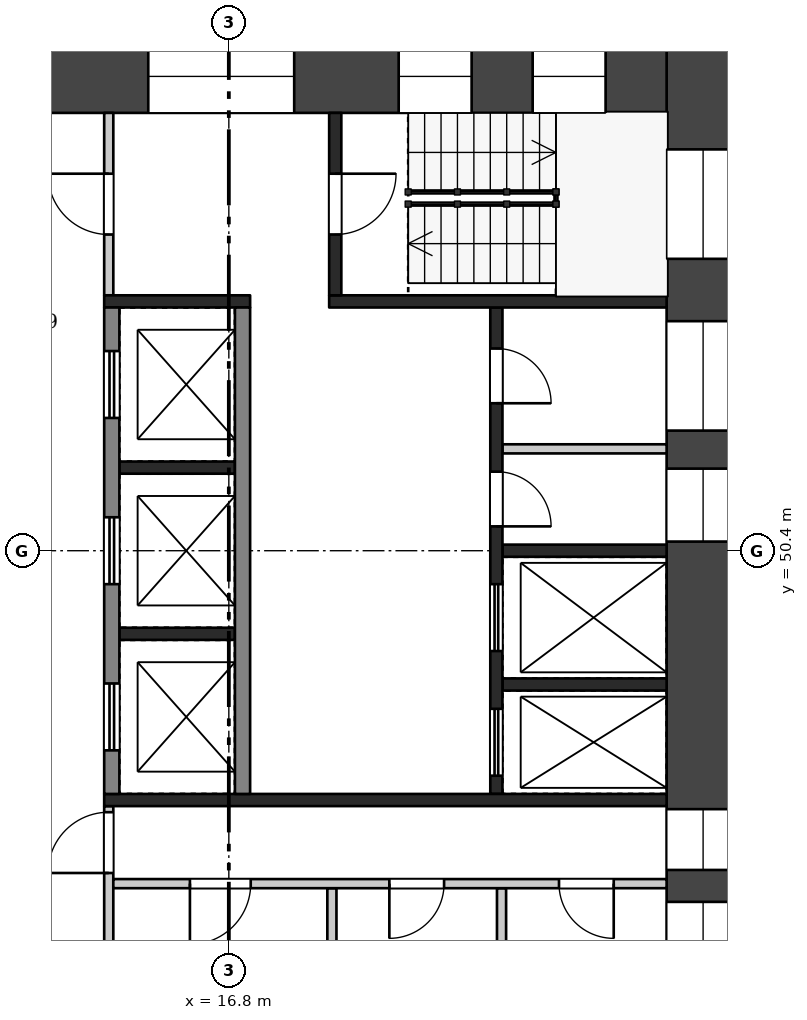
"""IFC4 building model, lengths in metres.
Left out: names, types, materials, properties, quantities, classifications, styles, units other than length and angle.
Written with IfcOpenShell. Run it as: python <this file> out.ifc"""

import sys

from ifc_helpers import new_model, si_unit, direction, frame, frame_2d, origin, place, context, subcontext, project, spatial, rectangle, extrude, element, fill, save


model = new_model("IFC4")
c1 = context("Model", 3, precision=1e-05, world=origin(), true_north=direction((0.0, 1.0)))
c2 = subcontext(c1, "Body", "Model", "MODEL_VIEW")
j1 = project(units=[si_unit("LENGTHUNIT", "METRE"), si_unit("PLANEANGLEUNIT", "RADIAN")], contexts=[c1])
p1 = place(None, origin())
s1 = spatial("IfcSite", under=j1, at=p1, CompositionType="ELEMENT")
p2 = place(p1, origin())
s2 = spatial("IfcBuilding", under=s1, at=p2, CompositionType="ELEMENT")
p3 = place(p2, frame((0.0, 0.0, 147.7)))
s3 = spatial("IfcBuildingStorey", under=s2, at=p3, CompositionType="ELEMENT", Elevation=147.7)
p4 = place(p3, frame((24.6, 58.8, 0.0), z_axis=(0.0, 0.0, 1.0), x_axis=(0.0, -1.0, 0.0)))
e1 = element("IfcWall", 1, at=p4, inside=s3, PredefinedType="SHEAR", context=c2, shape_type="SweptSolid", body=[
    extrude(rectangle(XDim=16.8, YDim=1.2, at=frame_2d((8.4, 0.0))), origin(), (0.0, 0.0, 1.0), 3.22),
])
p5 = place(p4, frame((1.8, 0.0, 0.5)))
e2 = element("IfcOpeningElement", 2, at=p5, cuts=e1, PredefinedType="OPENING", context=c2, shape_type="SweptSolid", body=[
    extrude(rectangle(XDim=1.8, YDim=2.4, at=frame_2d((0.9, 1.2))), frame((0.0, 0.61, 0.0), z_axis=(0.0, -1.0, 0.0), x_axis=(1.0, 0.0, 0.0)), (0.0, 0.0, 1.0), 1.22),
])
p6 = place(p4, frame((4.625, 0.0, 1.6)))
e3 = element("IfcOpeningElement", 3, at=p6, cuts=e1, PredefinedType="OPENING", context=c2, shape_type="SweptSolid", body=[
    extrude(rectangle(XDim=1.8, YDim=1.2, at=frame_2d((0.9, 0.6))), frame((0.0, 0.61, 0.0), z_axis=(0.0, -1.0, 0.0), x_axis=(1.0, 0.0, 0.0)), (0.0, 0.0, 1.0), 1.22),
])
p7 = place(p4, frame((7.05, 0.0, 1.6)))
e4 = element("IfcOpeningElement", 4, at=p7, cuts=e1, PredefinedType="OPENING", context=c2, shape_type="SweptSolid", body=[
    extrude(rectangle(XDim=1.2, YDim=1.2, at=frame_2d((0.6, 0.6))), frame((0.0, 0.61, 0.0), z_axis=(0.0, -1.0, 0.0), x_axis=(1.0, 0.0, 0.0)), (0.0, 0.0, 1.0), 1.22),
])
p8 = place(p4, frame((12.65, 0.0, 0.6)))
e5 = element("IfcOpeningElement", 5, at=p8, cuts=e1, PredefinedType="OPENING", context=c2, shape_type="SweptSolid", body=[
    extrude(rectangle(XDim=1.0, YDim=2.1, at=frame_2d((0.5, 1.05))), frame((0.0, 0.61, 0.0), z_axis=(0.0, -1.0, 0.0), x_axis=(1.0, 0.0, 0.0)), (0.0, 0.0, 1.0), 1.22),
])
p9 = place(p4, frame((14.175, 0.0, 1.6)))
e6 = element("IfcOpeningElement", 6, at=p9, cuts=e1, PredefinedType="OPENING", context=c2, shape_type="SweptSolid", body=[
    extrude(rectangle(XDim=1.2, YDim=1.2, at=frame_2d((0.6, 0.6))), frame((0.0, 0.61, 0.0), z_axis=(0.0, -1.0, 0.0), x_axis=(1.0, 0.0, 0.0)), (0.0, 0.0, 1.0), 1.22),
])
p10 = place(p3, frame((9.6, 58.2, 0.0), z_axis=(0.0, 0.0, 1.0), x_axis=(1.0, 0.0, 0.0)))
e7 = element("IfcWall", 7, at=p10, inside=s3, PredefinedType="SHEAR", context=c2, shape_type="SweptSolid", body=[
    extrude(rectangle(XDim=14.4, YDim=1.2, at=frame_2d((7.2, 0.0))), origin(), (0.0, 0.0, 1.0), 3.22),
])
p11 = place(p10, frame((1.105, 0.0, 0.6)))
e8 = element("IfcOpeningElement", 8, at=p11, cuts=e7, PredefinedType="OPENING", context=c2, shape_type="SweptSolid", body=[
    extrude(rectangle(XDim=3.0, YDim=2.1, at=frame_2d((1.5, 1.05))), frame((0.0, 0.61, 0.0), z_axis=(0.0, -1.0, 0.0), x_axis=(1.0, 0.0, 0.0)), (0.0, 0.0, 1.0), 1.22),
])
p12 = place(p10, frame((5.875, 0.0, 0.6)))
e9 = element("IfcOpeningElement", 9, at=p12, cuts=e7, PredefinedType="OPENING", context=c2, shape_type="SweptSolid", body=[
    extrude(rectangle(XDim=2.4, YDim=2.1, at=frame_2d((1.2, 1.05))), frame((0.0, 0.61, 0.0), z_axis=(0.0, -1.0, 0.0), x_axis=(1.0, 0.0, 0.0)), (0.0, 0.0, 1.0), 1.22),
])
p13 = place(p10, frame((9.993, 0.0, 0.5)))
e10 = element("IfcOpeningElement", 10, at=p13, cuts=e7, PredefinedType="OPENING", context=c2, shape_type="SweptSolid", body=[
    extrude(rectangle(XDim=1.2, YDim=2.4, at=frame_2d((0.6, 1.2))), frame((0.0, 0.61, 0.0), z_axis=(0.0, -1.0, 0.0), x_axis=(1.0, 0.0, 0.0)), (0.0, 0.0, 1.0), 1.22),
])
p14 = place(p10, frame((12.197, 0.0, 0.5)))
e11 = element("IfcOpeningElement", 11, at=p14, cuts=e7, PredefinedType="OPENING", context=c2, shape_type="SweptSolid", body=[
    extrude(rectangle(XDim=1.2, YDim=2.4, at=frame_2d((0.6, 1.2))), frame((0.0, 0.61, 0.0), z_axis=(0.0, -1.0, 0.0), x_axis=(1.0, 0.0, 0.0)), (0.0, 0.0, 1.0), 1.22),
])
for number, where, z_axis, x_axis in (
    (12, (15.0, 51.767, 0.0), (0.0, 0.0, 1.0), (1.0, 0.0, 0.0)),
    (13, (15.0, 49.033, 0.0), (0.0, 0.0, 1.0), (1.0, 0.0, 0.0)),
):
    element("IfcWall", number, at=place(p3, frame(where, z_axis=z_axis, x_axis=x_axis)), inside=s3, PredefinedType="SHEAR", context=c2, shape_type="SweptSolid", body=[
        extrude(rectangle(XDim=1.9, YDim=0.2, at=frame_2d((0.95, 0.0))), origin(), (0.0, 0.0, 1.0), 3.22),
    ])
p15 = place(p3, frame((14.875, 54.4, 0.0), z_axis=(0.0, 0.0, 1.0), x_axis=(0.0, -1.0, 0.0)))
e14 = element("IfcWall", 14, at=p15, inside=s3, PredefinedType="SHEAR", context=c2, shape_type="SweptSolid", body=[
    extrude(rectangle(XDim=8.0, YDim=0.25, at=frame_2d((4.0, 0.0))), origin(), (0.0, 0.0, 1.0), 3.22),
])
p16 = place(p15, frame((0.717, 0.0, 0.0)))
e15 = element("IfcOpeningElement", 15, at=p16, cuts=e14, PredefinedType="OPENING", context=c2, shape_type="SweptSolid", body=[
    extrude(rectangle(XDim=1.1, YDim=2.1, at=frame_2d((0.55, 1.05))), frame((0.0, 0.135, 0.0), z_axis=(0.0, -1.0, 0.0), x_axis=(1.0, 0.0, 0.0)), (0.0, 0.0, 1.0), 0.27),
])
p17 = place(p15, frame((3.45, 0.0, 0.0)))
e16 = element("IfcOpeningElement", 16, at=p17, cuts=e14, PredefinedType="OPENING", context=c2, shape_type="SweptSolid", body=[
    extrude(rectangle(XDim=1.1, YDim=2.1, at=frame_2d((0.55, 1.05))), frame((0.0, 0.135, 0.0), z_axis=(0.0, -1.0, 0.0), x_axis=(1.0, 0.0, 0.0)), (0.0, 0.0, 1.0), 0.27),
])
p18 = place(p15, frame((6.183, 0.0, 0.0)))
e17 = element("IfcOpeningElement", 17, at=p18, cuts=e14, PredefinedType="OPENING", context=c2, shape_type="SweptSolid", body=[
    extrude(rectangle(XDim=1.1, YDim=2.1, at=frame_2d((0.55, 1.05))), frame((0.0, 0.135, 0.0), z_axis=(0.0, -1.0, 0.0), x_axis=(1.0, 0.0, 0.0)), (0.0, 0.0, 1.0), 0.27),
])
p19 = place(p3, frame((17.025, 54.4, 0.0), z_axis=(0.0, 0.0, 1.0), x_axis=(0.0, -1.0, 0.0)))
e18 = element("IfcWall", 18, at=p19, inside=s3, PredefinedType="SHEAR", context=c2, shape_type="SweptSolid", body=[
    extrude(rectangle(XDim=8.0, YDim=0.25, at=frame_2d((4.0, 0.0))), origin(), (0.0, 0.0, 1.0), 3.22),
])
for number, where, z_axis, x_axis in (
    (19, (21.3, 50.4, 0.0), (0.0, 0.0, 1.0), (1.0, 0.0, 0.0)),
    (20, (21.3, 48.2, 0.0), (0.0, 0.0, 1.0), (1.0, 0.0, 0.0)),
):
    element("IfcWall", number, at=place(p3, frame(where, z_axis=z_axis, x_axis=x_axis)), inside=s3, PredefinedType="SHEAR", context=c2, shape_type="SweptSolid", body=[
        extrude(rectangle(XDim=2.7, YDim=0.2, at=frame_2d((1.35, 0.0))), origin(), (0.0, 0.0, 1.0), 3.22),
    ])
p20 = place(p3, frame((21.3, 52.075, 0.0), z_axis=(0.0, 0.0, 1.0), x_axis=(1.0, 0.0, 0.0)))
e21 = element("IfcWall", 21, at=p20, inside=s3, PredefinedType="PARTITIONING", context=c2, shape_type="SweptSolid", body=[
    extrude(rectangle(XDim=2.7, YDim=0.15, at=frame_2d((1.35, 0.0))), origin(), (0.0, 0.0, 1.0), 3.22),
])
p21 = place(p3, frame((21.2, 54.4, 0.0), z_axis=(0.0, 0.0, 1.0), x_axis=(0.0, -1.0, 0.0)))
e22 = element("IfcWall", 22, at=p21, inside=s3, PredefinedType="SHEAR", context=c2, shape_type="SweptSolid", body=[
    extrude(rectangle(XDim=8.0, YDim=0.2, at=frame_2d((4.0, 0.0))), origin(), (0.0, 0.0, 1.0), 3.22),
])
p22 = place(p21, frame((0.675, 0.0, 0.0)))
e23 = element("IfcOpeningElement", 23, at=p22, cuts=e22, PredefinedType="OPENING", context=c2, shape_type="SweptSolid", body=[
    extrude(rectangle(XDim=0.9, YDim=2.1, at=frame_2d((0.45, 1.05))), frame((0.0, 0.11, 0.0), z_axis=(0.0, -1.0, 0.0), x_axis=(1.0, 0.0, 0.0)), (0.0, 0.0, 1.0), 0.22),
])
p23 = place(p21, frame((2.7, 0.0, 0.0)))
e24 = element("IfcOpeningElement", 24, at=p23, cuts=e22, PredefinedType="OPENING", context=c2, shape_type="SweptSolid", body=[
    extrude(rectangle(XDim=0.9, YDim=2.1, at=frame_2d((0.45, 1.05))), frame((0.0, 0.11, 0.0), z_axis=(0.0, -1.0, 0.0), x_axis=(1.0, 0.0, 0.0)), (0.0, 0.0, 1.0), 0.22),
])
p24 = place(p21, frame((4.55, 0.0, 0.0)))
e25 = element("IfcOpeningElement", 25, at=p24, cuts=e22, PredefinedType="OPENING", context=c2, shape_type="SweptSolid", body=[
    extrude(rectangle(XDim=1.1, YDim=2.1, at=frame_2d((0.55, 1.05))), frame((0.0, 0.11, 0.0), z_axis=(0.0, -1.0, 0.0), x_axis=(1.0, 0.0, 0.0)), (0.0, 0.0, 1.0), 0.22),
])
p25 = place(p21, frame((6.6, 0.0, 0.0)))
e26 = element("IfcOpeningElement", 26, at=p25, cuts=e22, PredefinedType="OPENING", context=c2, shape_type="SweptSolid", body=[
    extrude(rectangle(XDim=1.1, YDim=2.1, at=frame_2d((0.55, 1.05))), frame((0.0, 0.11, 0.0), z_axis=(0.0, -1.0, 0.0), x_axis=(1.0, 0.0, 0.0)), (0.0, 0.0, 1.0), 0.22),
])
p26 = place(p3, frame((14.75, 54.5, 0.0), z_axis=(0.0, 0.0, 1.0), x_axis=(1.0, 0.0, 0.0)))
e27 = element("IfcWall", 27, at=p26, inside=s3, PredefinedType="SHEAR", context=c2, shape_type="SweptSolid", body=[
    extrude(rectangle(XDim=2.4, YDim=0.2, at=frame_2d((1.2, 0.0))), origin(), (0.0, 0.0, 1.0), 3.22),
])
p27 = place(p3, frame((18.45, 54.5, 0.0), z_axis=(0.0, 0.0, 1.0), x_axis=(1.0, 0.0, 0.0)))
e28 = element("IfcWall", 28, at=p27, inside=s3, PredefinedType="SHEAR", context=c2, shape_type="SweptSolid", body=[
    extrude(rectangle(XDim=5.55, YDim=0.2, at=frame_2d((2.775, 0.0))), origin(), (0.0, 0.0, 1.0), 3.22),
])
p28 = place(p3, frame((14.825, 57.6, 0.0), z_axis=(0.0, 0.0, 1.0), x_axis=(0.0, -1.0, 0.0)))
e29 = element("IfcWall", 29, at=p28, inside=s3, PredefinedType="PARTITIONING", context=c2, shape_type="SweptSolid", body=[
    extrude(rectangle(XDim=3.0, YDim=0.15, at=frame_2d((1.5, 0.0))), origin(), (0.0, 0.0, 1.0), 3.22),
])
p29 = place(p28, frame((1.0, 0.0, 0.0)))
e30 = element("IfcOpeningElement", 30, at=p29, cuts=e29, PredefinedType="OPENING", context=c2, shape_type="SweptSolid", body=[
    extrude(rectangle(XDim=1.0, YDim=2.1, at=frame_2d((0.5, 1.05))), frame((0.0, 0.085, 0.0), z_axis=(0.0, -1.0, 0.0), x_axis=(1.0, 0.0, 0.0)), (0.0, 0.0, 1.0), 0.17),
])
p30 = place(p3, frame((18.55, 57.6, 0.0), z_axis=(0.0, 0.0, 1.0), x_axis=(0.0, -1.0, 0.0)))
e31 = element("IfcWall", 31, at=p30, inside=s3, PredefinedType="SHEAR", context=c2, shape_type="SweptSolid", body=[
    extrude(rectangle(XDim=3.0, YDim=0.2, at=frame_2d((1.5, 0.0))), origin(), (0.0, 0.0, 1.0), 3.22),
])
p31 = place(p30, frame((1.0, 0.0, 0.0)))
e32 = element("IfcOpeningElement", 32, at=p31, cuts=e31, PredefinedType="OPENING", context=c2, shape_type="SweptSolid", body=[
    extrude(rectangle(XDim=1.0, YDim=2.1, at=frame_2d((0.5, 1.05))), frame((0.0, 0.11, 0.0), z_axis=(0.0, -1.0, 0.0), x_axis=(1.0, 0.0, 0.0)), (0.0, 0.0, 1.0), 0.22),
])
p32 = place(p3, frame((14.75, 46.3, 0.0), z_axis=(0.0, 0.0, 1.0), x_axis=(1.0, 0.0, 0.0)))
e33 = element("IfcWall", 33, at=p32, inside=s3, PredefinedType="SHEAR", context=c2, shape_type="SweptSolid", body=[
    extrude(rectangle(XDim=9.25, YDim=0.2, at=frame_2d((4.625, 0.0))), origin(), (0.0, 0.0, 1.0), 3.22),
])
p33 = place(p3, frame((14.825, 46.2, 0.0), z_axis=(0.0, 0.0, 1.0), x_axis=(0.0, -1.0, 0.0)))
e34 = element("IfcWall", 34, at=p33, inside=s3, PredefinedType="PARTITIONING", context=c2, shape_type="SweptSolid", body=[
    extrude(rectangle(XDim=3.0, YDim=0.15, at=frame_2d((1.5, 0.0))), origin(), (0.0, 0.0, 1.0), 3.22),
])
p34 = place(p33, frame((0.1, 0.0, 0.0)))
e35 = element("IfcOpeningElement", 35, at=p34, cuts=e34, PredefinedType="OPENING", context=c2, shape_type="SweptSolid", body=[
    extrude(rectangle(XDim=1.0, YDim=2.1, at=frame_2d((0.5, 1.05))), frame((0.0, 0.085, 0.0), z_axis=(0.0, -1.0, 0.0), x_axis=(1.0, 0.0, 0.0)), (0.0, 0.0, 1.0), 0.17),
])
for number, where, z_axis, x_axis in (
    (36, (18.495, 44.85, 0.0), (0.0, 0.0, 1.0), (0.0, -1.0, 0.0)),
    (37, (21.285, 44.85, 0.0), (0.0, 0.0, 1.0), (0.0, -1.0, 0.0)),
):
    element("IfcWall", number, at=place(p3, frame(where, z_axis=z_axis, x_axis=x_axis)), inside=s3, PredefinedType="PARTITIONING", context=c2, shape_type="SweptSolid", body=[
        extrude(rectangle(XDim=1.65, YDim=0.15, at=frame_2d((0.825, 0.0))), origin(), (0.0, 0.0, 1.0), 3.22),
    ])
p35 = place(p3, frame((14.9, 44.925, 0.0), z_axis=(0.0, 0.0, 1.0), x_axis=(1.0, 0.0, 0.0)))
e38 = element("IfcWall", 38, at=p35, inside=s3, PredefinedType="PARTITIONING", context=c2, shape_type="SweptSolid", body=[
    extrude(rectangle(XDim=9.1, YDim=0.15, at=frame_2d((4.55, 0.0))), origin(), (0.0, 0.0, 1.0), 3.22),
])
p36 = place(p35, frame((1.26, 0.0, 0.0)))
e39 = element("IfcOpeningElement", 39, at=p36, cuts=e38, PredefinedType="OPENING", context=c2, shape_type="SweptSolid", body=[
    extrude(rectangle(XDim=1.0, YDim=2.1, at=frame_2d((0.5, 1.05))), frame((0.0, 0.085, 0.0), z_axis=(0.0, -1.0, 0.0), x_axis=(1.0, 0.0, 0.0)), (0.0, 0.0, 1.0), 0.17),
])
p37 = place(p35, frame((4.54, 0.0, 0.0)))
e40 = element("IfcOpeningElement", 40, at=p37, cuts=e38, PredefinedType="OPENING", context=c2, shape_type="SweptSolid", body=[
    extrude(rectangle(XDim=0.9, YDim=2.1, at=frame_2d((0.45, 1.05))), frame((0.0, 0.085, 0.0), z_axis=(0.0, -1.0, 0.0), x_axis=(1.0, 0.0, 0.0)), (0.0, 0.0, 1.0), 0.17),
])
p38 = place(p35, frame((7.33, 0.0, 0.0)))
e41 = element("IfcOpeningElement", 41, at=p38, cuts=e38, PredefinedType="OPENING", context=c2, shape_type="SweptSolid", body=[
    extrude(rectangle(XDim=0.9, YDim=2.1, at=frame_2d((0.45, 1.05))), frame((0.0, 0.085, 0.0), z_axis=(0.0, -1.0, 0.0), x_axis=(1.0, 0.0, 0.0)), (0.0, 0.0, 1.0), 0.17),
])
p39 = place(p16, origin())
e42 = element("IfcDoor", 42, at=p39, inside=s3, OperationType="DOUBLE_DOOR_SLIDING", PredefinedType="DOOR", context=c2, shape_type="SweptSolid", body=[
    extrude(rectangle(XDim=1.1, YDim=2.1, at=frame_2d((0.55, 1.05))), frame((0.0, 0.025, 0.0), z_axis=(0.0, -1.0, 0.0), x_axis=(1.0, 0.0, 0.0)), (0.0, 0.0, 1.0), 0.05),
])
fill(e15, e42)
p40 = place(p17, origin())
e43 = element("IfcDoor", 43, at=p40, inside=s3, OperationType="DOUBLE_DOOR_SLIDING", PredefinedType="DOOR", context=c2, shape_type="SweptSolid", body=[
    extrude(rectangle(XDim=1.1, YDim=2.1, at=frame_2d((0.55, 1.05))), frame((0.0, 0.025, 0.0), z_axis=(0.0, -1.0, 0.0), x_axis=(1.0, 0.0, 0.0)), (0.0, 0.0, 1.0), 0.05),
])
fill(e16, e43)
p41 = place(p18, origin())
e44 = element("IfcDoor", 44, at=p41, inside=s3, OperationType="DOUBLE_DOOR_SLIDING", PredefinedType="DOOR", context=c2, shape_type="SweptSolid", body=[
    extrude(rectangle(XDim=1.1, YDim=2.1, at=frame_2d((0.55, 1.05))), frame((0.0, 0.025, 0.0), z_axis=(0.0, -1.0, 0.0), x_axis=(1.0, 0.0, 0.0)), (0.0, 0.0, 1.0), 0.05),
])
fill(e17, e44)
p42 = place(p22, origin())
e45 = element("IfcDoor", 45, at=p42, inside=s3, OperationType="SINGLE_SWING_RIGHT", PredefinedType="DOOR", context=c2, shape_type="SweptSolid", body=[
    extrude(rectangle(XDim=0.9, YDim=2.1, at=frame_2d((0.45, 1.05))), frame((0.0, 0.025, 0.0), z_axis=(0.0, -1.0, 0.0), x_axis=(1.0, 0.0, 0.0)), (0.0, 0.0, 1.0), 0.05),
])
fill(e23, e45)
p43 = place(p23, origin())
e46 = element("IfcDoor", 46, at=p43, inside=s3, OperationType="SINGLE_SWING_RIGHT", PredefinedType="DOOR", context=c2, shape_type="SweptSolid", body=[
    extrude(rectangle(XDim=0.9, YDim=2.1, at=frame_2d((0.45, 1.05))), frame((0.0, 0.025, 0.0), z_axis=(0.0, -1.0, 0.0), x_axis=(1.0, 0.0, 0.0)), (0.0, 0.0, 1.0), 0.05),
])
fill(e24, e46)
p44 = place(p24, origin())
e47 = element("IfcDoor", 47, at=p44, inside=s3, OperationType="DOUBLE_DOOR_SLIDING", PredefinedType="DOOR", context=c2, shape_type="SweptSolid", body=[
    extrude(rectangle(XDim=1.1, YDim=2.1, at=frame_2d((0.55, 1.05))), frame((0.0, 0.025, 0.0), z_axis=(0.0, -1.0, 0.0), x_axis=(1.0, 0.0, 0.0)), (0.0, 0.0, 1.0), 0.05),
])
fill(e25, e47)
p45 = place(p25, origin())
e48 = element("IfcDoor", 48, at=p45, inside=s3, OperationType="DOUBLE_DOOR_SLIDING", PredefinedType="DOOR", context=c2, shape_type="SweptSolid", body=[
    extrude(rectangle(XDim=1.1, YDim=2.1, at=frame_2d((0.55, 1.05))), frame((0.0, 0.025, 0.0), z_axis=(0.0, -1.0, 0.0), x_axis=(1.0, 0.0, 0.0)), (0.0, 0.0, 1.0), 0.05),
])
fill(e26, e48)
p46 = place(p29, frame((1.0, 0.0, 0.0), z_axis=(0.0, 0.0, 1.0), x_axis=(-1.0, 0.0, 0.0)))
e49 = element("IfcDoor", 49, at=p46, inside=s3, OperationType="SINGLE_SWING_RIGHT", PredefinedType="DOOR", context=c2, shape_type="SweptSolid", body=[
    extrude(rectangle(XDim=1.0, YDim=2.1, at=frame_2d((0.5, 1.05))), frame((0.0, 0.025, 0.0), z_axis=(0.0, -1.0, 0.0), x_axis=(1.0, 0.0, 0.0)), (0.0, 0.0, 1.0), 0.05),
])
fill(e30, e49)
p47 = place(p31, origin())
e50 = element("IfcDoor", 50, at=p47, inside=s3, OperationType="SINGLE_SWING_LEFT", PredefinedType="DOOR", context=c2, shape_type="SweptSolid", body=[
    extrude(rectangle(XDim=1.0, YDim=2.1, at=frame_2d((0.5, 1.05))), frame((0.0, 0.025, 0.0), z_axis=(0.0, -1.0, 0.0), x_axis=(1.0, 0.0, 0.0)), (0.0, 0.0, 1.0), 0.05),
])
fill(e32, e50)
p48 = place(p34, frame((1.0, 0.0, 0.0), z_axis=(0.0, 0.0, 1.0), x_axis=(-1.0, 0.0, 0.0)))
e51 = element("IfcDoor", 51, at=p48, inside=s3, OperationType="SINGLE_SWING_LEFT", PredefinedType="DOOR", context=c2, shape_type="SweptSolid", body=[
    extrude(rectangle(XDim=1.0, YDim=2.1, at=frame_2d((0.5, 1.05))), frame((0.0, 0.025, 0.0), z_axis=(0.0, -1.0, 0.0), x_axis=(1.0, 0.0, 0.0)), (0.0, 0.0, 1.0), 0.05),
])
fill(e35, e51)
p49 = place(p36, frame((1.0, 0.0, 0.0), z_axis=(0.0, 0.0, 1.0), x_axis=(-1.0, 0.0, 0.0)))
e52 = element("IfcDoor", 52, at=p49, inside=s3, OperationType="SINGLE_SWING_RIGHT", PredefinedType="DOOR", context=c2, shape_type="SweptSolid", body=[
    extrude(rectangle(XDim=1.0, YDim=2.1, at=frame_2d((0.5, 1.05))), frame((0.0, 0.025, 0.0), z_axis=(0.0, -1.0, 0.0), x_axis=(1.0, 0.0, 0.0)), (0.0, 0.0, 1.0), 0.05),
])
fill(e39, e52)
p50 = place(p37, frame((0.9, 0.0, 0.0), z_axis=(0.0, 0.0, 1.0), x_axis=(-1.0, 0.0, 0.0)))
e53 = element("IfcDoor", 53, at=p50, inside=s3, OperationType="SINGLE_SWING_RIGHT", PredefinedType="DOOR", context=c2, shape_type="SweptSolid", body=[
    extrude(rectangle(XDim=0.9, YDim=2.1, at=frame_2d((0.45, 1.05))), frame((0.0, 0.025, 0.0), z_axis=(0.0, -1.0, 0.0), x_axis=(1.0, 0.0, 0.0)), (0.0, 0.0, 1.0), 0.05),
])
fill(e40, e53)
p51 = place(p38, frame((0.9, 0.0, 0.0), z_axis=(0.0, 0.0, 1.0), x_axis=(-1.0, 0.0, 0.0)))
e54 = element("IfcDoor", 54, at=p51, inside=s3, OperationType="SINGLE_SWING_LEFT", PredefinedType="DOOR", context=c2, shape_type="SweptSolid", body=[
    extrude(rectangle(XDim=0.9, YDim=2.1, at=frame_2d((0.45, 1.05))), frame((0.0, 0.025, 0.0), z_axis=(0.0, -1.0, 0.0), x_axis=(1.0, 0.0, 0.0)), (0.0, 0.0, 1.0), 0.05),
])
fill(e41, e54)
p52 = place(p5, origin())
e55 = element("IfcWindow", 55, at=p52, inside=s3, PartitioningType="SINGLE_PANEL", PredefinedType="WINDOW", context=c2, shape_type="SweptSolid", body=[
    extrude(rectangle(XDim=1.8, YDim=2.4, at=frame_2d((0.9, 1.2))), frame((0.0, 0.03, 0.0), z_axis=(0.0, -1.0, 0.0), x_axis=(1.0, 0.0, 0.0)), (0.0, 0.0, 1.0), 0.06),
])
fill(e2, e55)
p53 = place(p6, origin())
e56 = element("IfcWindow", 56, at=p53, inside=s3, PartitioningType="SINGLE_PANEL", PredefinedType="WINDOW", context=c2, shape_type="SweptSolid", body=[
    extrude(rectangle(XDim=1.8, YDim=1.2, at=frame_2d((0.9, 0.6))), frame((0.0, 0.03, 0.0), z_axis=(0.0, -1.0, 0.0), x_axis=(1.0, 0.0, 0.0)), (0.0, 0.0, 1.0), 0.06),
])
fill(e3, e56)
p54 = place(p7, origin())
e57 = element("IfcWindow", 57, at=p54, inside=s3, PartitioningType="SINGLE_PANEL", PredefinedType="WINDOW", context=c2, shape_type="SweptSolid", body=[
    extrude(rectangle(XDim=1.2, YDim=1.2, at=frame_2d((0.6, 0.6))), frame((0.0, 0.03, 0.0), z_axis=(0.0, -1.0, 0.0), x_axis=(1.0, 0.0, 0.0)), (0.0, 0.0, 1.0), 0.06),
])
fill(e4, e57)
p55 = place(p8, origin())
e58 = element("IfcWindow", 58, at=p55, inside=s3, PartitioningType="SINGLE_PANEL", PredefinedType="WINDOW", context=c2, shape_type="SweptSolid", body=[
    extrude(rectangle(XDim=1.0, YDim=2.1, at=frame_2d((0.5, 1.05))), frame((0.0, 0.03, 0.0), z_axis=(0.0, -1.0, 0.0), x_axis=(1.0, 0.0, 0.0)), (0.0, 0.0, 1.0), 0.06),
])
fill(e5, e58)
p56 = place(p9, origin())
e59 = element("IfcWindow", 59, at=p56, inside=s3, PartitioningType="SINGLE_PANEL", PredefinedType="WINDOW", context=c2, shape_type="SweptSolid", body=[
    extrude(rectangle(XDim=1.2, YDim=1.2, at=frame_2d((0.6, 0.6))), frame((0.0, 0.03, 0.0), z_axis=(0.0, -1.0, 0.0), x_axis=(1.0, 0.0, 0.0)), (0.0, 0.0, 1.0), 0.06),
])
fill(e6, e59)
p57 = place(p12, origin())
e60 = element("IfcWindow", 60, at=p57, inside=s3, PartitioningType="SINGLE_PANEL", PredefinedType="WINDOW", context=c2, shape_type="SweptSolid", body=[
    extrude(rectangle(XDim=2.4, YDim=2.1, at=frame_2d((1.2, 1.05))), frame((0.0, 0.03, 0.0), z_axis=(0.0, -1.0, 0.0), x_axis=(1.0, 0.0, 0.0)), (0.0, 0.0, 1.0), 0.06),
])
fill(e9, e60)
p58 = place(p13, origin())
e61 = element("IfcWindow", 61, at=p58, inside=s3, PartitioningType="SINGLE_PANEL", PredefinedType="WINDOW", context=c2, shape_type="SweptSolid", body=[
    extrude(rectangle(XDim=1.2, YDim=2.4, at=frame_2d((0.6, 1.2))), frame((0.0, 0.03, 0.0), z_axis=(0.0, -1.0, 0.0), x_axis=(1.0, 0.0, 0.0)), (0.0, 0.0, 1.0), 0.06),
])
fill(e10, e61)
p59 = place(p14, origin())
e62 = element("IfcWindow", 62, at=p59, inside=s3, PartitioningType="SINGLE_PANEL", PredefinedType="WINDOW", context=c2, shape_type="SweptSolid", body=[
    extrude(rectangle(XDim=1.2, YDim=2.4, at=frame_2d((0.6, 1.2))), frame((0.0, 0.03, 0.0), z_axis=(0.0, -1.0, 0.0), x_axis=(1.0, 0.0, 0.0)), (0.0, 0.0, 1.0), 0.06),
])
fill(e11, e62)
save(model, sys.argv[1])
